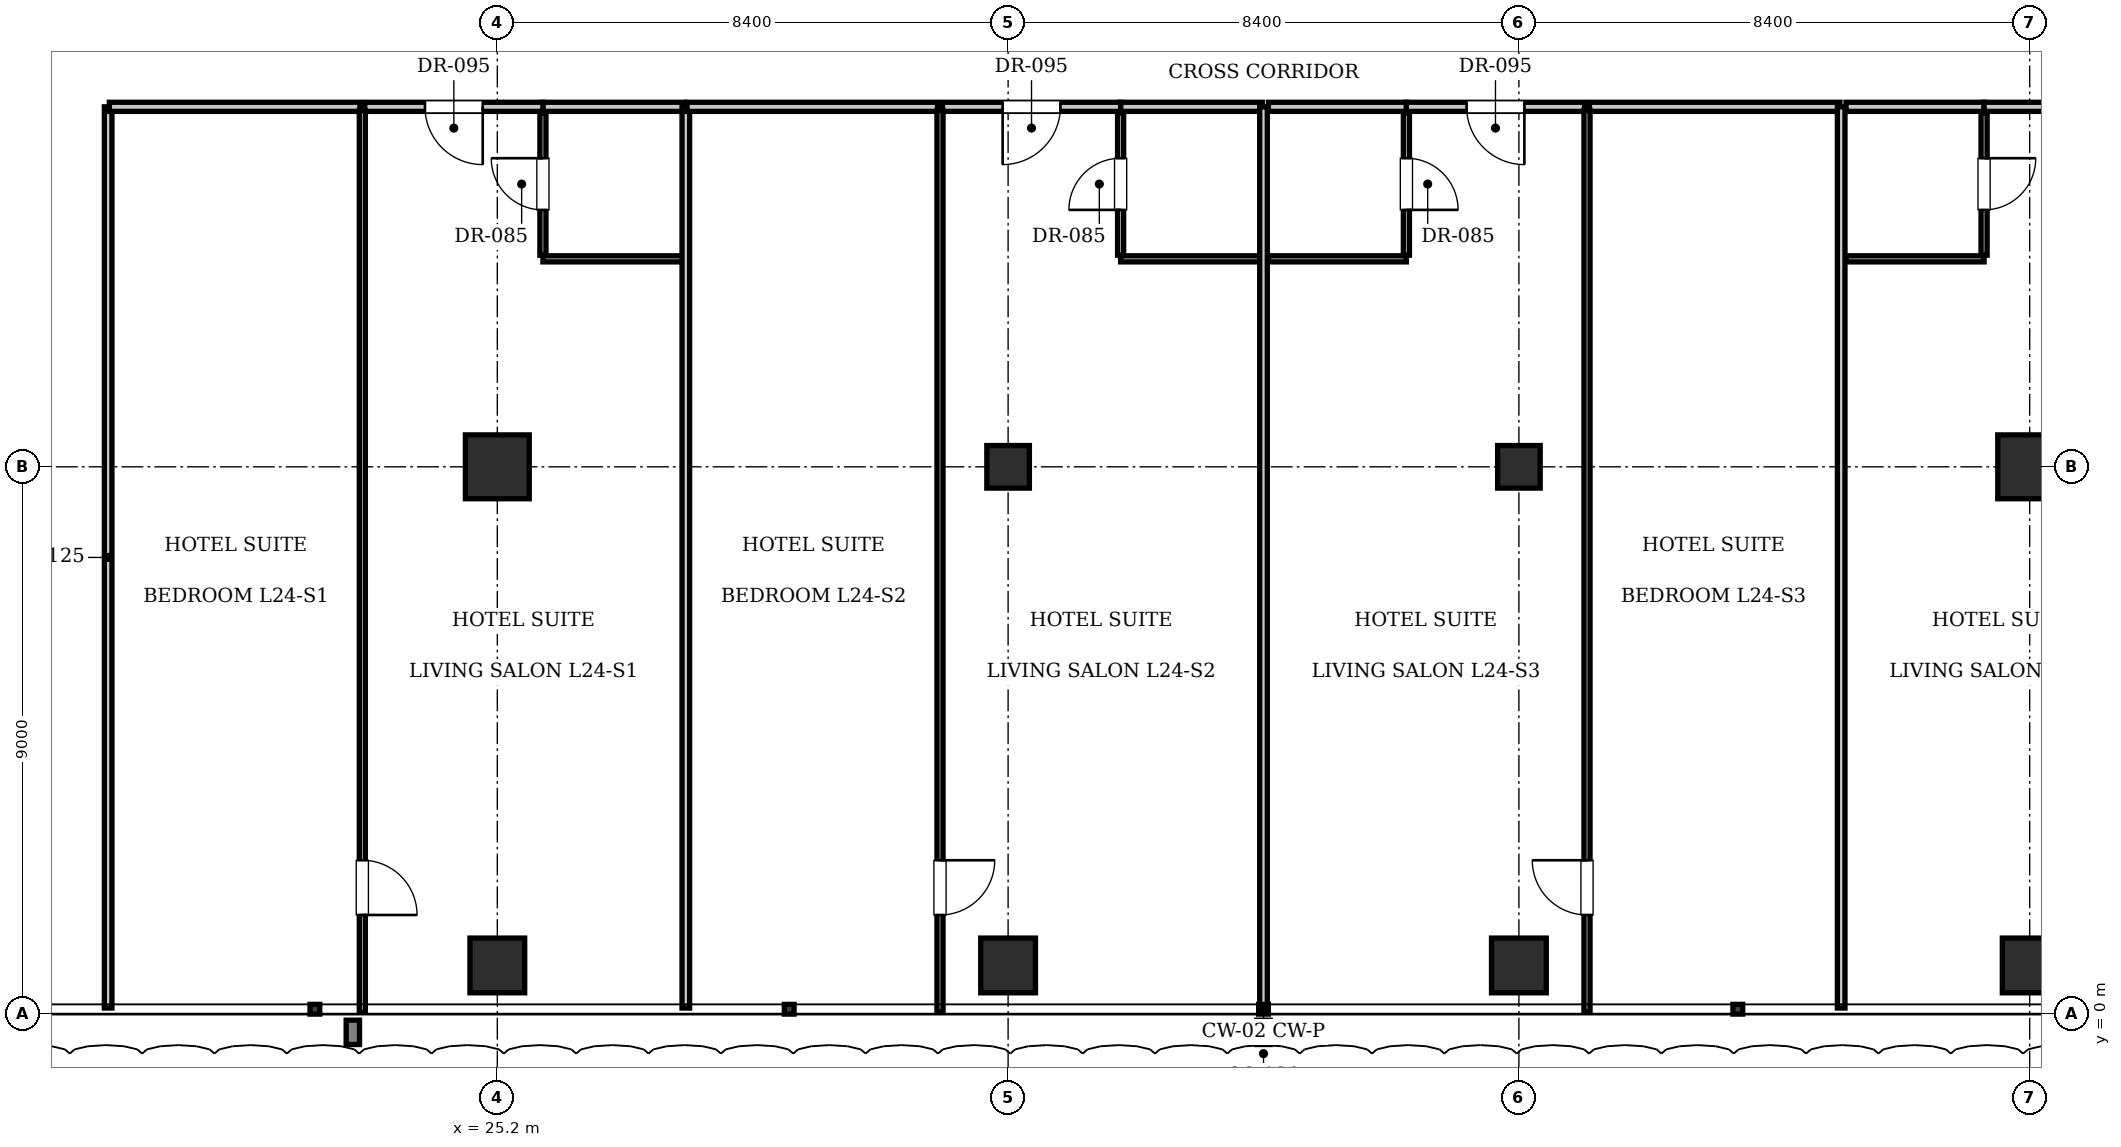
"""IFC4 building model, lengths in metres.
Left out: names, types, materials, properties, quantities, classifications, styles, units other than length and angle.
Written with IfcOpenShell. Run it as: python <this file> out.ifc"""

import sys

from ifc_helpers import new_model, si_unit, direction, frame, frame_2d, origin, origin_2d, place, context, subcontext, project, spatial, rectangle, i_section, extrude, element, fill, save


model = new_model("IFC4")
c1 = context("Model", 3, precision=1e-05, world=origin(), true_north=direction((0.0, 1.0)))
c2 = subcontext(c1, "Body", "Model", "MODEL_VIEW")
j1 = project(units=[si_unit("LENGTHUNIT", "METRE"), si_unit("PLANEANGLEUNIT", "RADIAN")], contexts=[c1])
p1 = place(None, origin())
s1 = spatial("IfcSite", under=j1, at=p1, CompositionType="ELEMENT")
p2 = place(p1, origin())
s2 = spatial("IfcBuilding", under=s1, at=p2, CompositionType="ELEMENT")
p3 = place(p2, frame((0.0, 0.0, 100.1)))
s3 = spatial("IfcBuildingStorey", under=s2, at=p3, CompositionType="ELEMENT", Elevation=100.1)
for number, where, z_axis, x_axis in (
    (1, (25.2, 9.0, 0.0), (0.0, 0.0, 1.0), (1.0, 0.0, 0.0)),
    (2, (50.4, 9.0, 0.0), (0.0, 0.0, 1.0), (1.0, 0.0, 0.0)),
):
    element("IfcColumn", number, at=place(p3, frame(where, z_axis=z_axis, x_axis=x_axis)), inside=s3, PredefinedType="COLUMN", context=c2, shape_type="SweptSolid", body=[
        extrude(rectangle(XDim=1.05, YDim=1.05, at=origin_2d()), origin(), (0.0, 0.0, 1.0), 3.85),
    ])
for number, where, z_axis, x_axis in (
    (3, (33.6, 9.0, 0.0), (0.0, 0.0, 1.0), (1.0, 0.0, 0.0)),
    (4, (42.0, 9.0, 0.0), (0.0, 0.0, 1.0), (1.0, 0.0, 0.0)),
):
    element("IfcColumn", number, at=place(p3, frame(where, z_axis=z_axis, x_axis=x_axis)), inside=s3, PredefinedType="COLUMN", context=c2, shape_type="SweptSolid", body=[
        extrude(i_section(OverallWidth=0.7, OverallDepth=0.7, WebThickness=0.028, FlangeThickness=0.044, at=origin_2d()), origin(), (0.0, 0.0, 1.0), 3.85),
    ])
for number, where, z_axis, x_axis in (
    (5, (25.2, 0.8, 0.0), (0.0, 0.0, 1.0), (1.0, 0.0, 0.0)),
    (6, (33.6, 0.8, 0.0), (0.0, 0.0, 1.0), (1.0, 0.0, 0.0)),
    (7, (42.0, 0.8, 0.0), (0.0, 0.0, 1.0), (1.0, 0.0, 0.0)),
    (8, (50.4, 0.8, 0.0), (0.0, 0.0, 1.0), (1.0, 0.0, 0.0)),
):
    element("IfcColumn", number, at=place(p3, frame(where, z_axis=z_axis, x_axis=x_axis)), inside=s3, PredefinedType="COLUMN", context=c2, shape_type="SweptSolid", body=[
        extrude(rectangle(XDim=0.9, YDim=0.9, at=origin_2d()), origin(), (0.0, 0.0, 1.0), 3.85),
    ])
p4 = place(p3, frame((18.8, 0.1, 0.0), z_axis=(0.0, 0.0, 1.0), x_axis=(0.0, 1.0, 0.0)))
e9 = element("IfcWall", 9, at=p4, inside=s3, PredefinedType="PARTITIONING", context=c2, shape_type="SweptSolid", body=[
    extrude(rectangle(XDim=14.82, YDim=0.125, at=frame_2d((7.41, 0.0))), origin(), (0.0, 0.0, 1.0), 3.61),
])
p5 = place(p3, frame((25.95, 14.92, 0.0), z_axis=(0.0, 0.0, 1.0), x_axis=(1.0, 0.0, 0.0)))
e10 = element("IfcWall", 10, at=p5, inside=s3, PredefinedType="PARTITIONING", context=c2, shape_type="SweptSolid", body=[
    extrude(rectangle(XDim=2.33, YDim=0.15, at=frame_2d((1.165, 0.0))), origin(), (0.0, 0.0, 1.0), 3.61),
])
p6 = place(p3, frame((25.95, 12.42, 0.0), z_axis=(0.0, 0.0, 1.0), x_axis=(1.0, 0.0, 0.0)))
e11 = element("IfcWall", 11, at=p6, inside=s3, PredefinedType="PARTITIONING", context=c2, shape_type="SweptSolid", body=[
    extrude(rectangle(XDim=2.31, YDim=0.1, at=frame_2d((1.155, 0.0))), origin(), (0.0, 0.0, 1.0), 3.61),
])
p7 = place(p3, frame((25.95, 12.48, 0.0), z_axis=(0.0, 0.0, 1.0), x_axis=(0.0, 1.0, 0.0)))
e12 = element("IfcWall", 12, at=p7, inside=s3, PredefinedType="PARTITIONING", context=c2, shape_type="SweptSolid", body=[
    extrude(rectangle(XDim=2.34, YDim=0.1, at=frame_2d((1.17, 0.0))), origin(), (0.0, 0.0, 1.0), 3.61),
])
p8 = place(p7, frame((0.745, 0.0, 0.0)))
e13 = element("IfcOpeningElement", 13, at=p8, cuts=e12, PredefinedType="OPENING", context=c2, shape_type="SweptSolid", body=[
    extrude(rectangle(XDim=0.85, YDim=2.1, at=frame_2d((0.425, 1.05))), frame((0.0, 0.06, 0.0), z_axis=(0.0, -1.0, 0.0), x_axis=(1.0, 0.0, 0.0)), (0.0, 0.0, 1.0), 0.12),
])
p9 = place(p3, frame((18.82, 14.92, 0.0), z_axis=(0.0, 0.0, 1.0), x_axis=(1.0, 0.0, 0.0)))
e14 = element("IfcWall", 14, at=p9, inside=s3, PredefinedType="PARTITIONING", context=c2, shape_type="SweptSolid", body=[
    extrude(rectangle(XDim=4.12, YDim=0.15, at=frame_2d((2.06, 0.0))), origin(), (0.0, 0.0, 1.0), 3.61),
])
p10 = place(p3, frame((23.02, 14.92, 0.0), z_axis=(0.0, 0.0, 1.0), x_axis=(1.0, 0.0, 0.0)))
e15 = element("IfcWall", 15, at=p10, inside=s3, PredefinedType="PARTITIONING", context=c2, shape_type="SweptSolid", body=[
    extrude(rectangle(XDim=2.93, YDim=0.15, at=frame_2d((1.465, 0.0))), origin(), (0.0, 0.0, 1.0), 3.61),
])
p11 = place(p10, frame((0.99, 0.0, 0.0)))
e16 = element("IfcOpeningElement", 16, at=p11, cuts=e15, PredefinedType="OPENING", context=c2, shape_type="SweptSolid", body=[
    extrude(rectangle(XDim=0.95, YDim=2.15, at=frame_2d((0.475, 1.075))), frame((0.0, 0.085, 0.0), z_axis=(0.0, -1.0, 0.0), x_axis=(1.0, 0.0, 0.0)), (0.0, 0.0, 1.0), 0.17),
])
p12 = place(p3, frame((22.98, 0.03, 0.0), z_axis=(0.0, 0.0, 1.0), x_axis=(0.0, 1.0, 0.0)))
e17 = element("IfcWall", 17, at=p12, inside=s3, PredefinedType="PARTITIONING", context=c2, shape_type="SweptSolid", body=[
    extrude(rectangle(XDim=14.83, YDim=0.1, at=frame_2d((7.415, 0.0))), origin(), (0.0, 0.0, 1.0), 3.61),
])
p13 = place(p12, frame((1.6, 0.0, 0.0)))
e18 = element("IfcOpeningElement", 18, at=p13, cuts=e17, PredefinedType="OPENING", context=c2, shape_type="SweptSolid", body=[
    extrude(rectangle(XDim=0.9, YDim=2.1, at=frame_2d((0.45, 1.05))), frame((0.0, 0.06, 0.0), z_axis=(0.0, -1.0, 0.0), x_axis=(1.0, 0.0, 0.0)), (0.0, 0.0, 1.0), 0.12),
])
p14 = place(p3, frame((28.3, 0.1, 0.0), z_axis=(0.0, 0.0, 1.0), x_axis=(0.0, 1.0, 0.0)))
e19 = element("IfcWall", 19, at=p14, inside=s3, PredefinedType="PARTITIONING", context=c2, shape_type="SweptSolid", body=[
    extrude(rectangle(XDim=14.82, YDim=0.125, at=frame_2d((7.41, 0.0))), origin(), (0.0, 0.0, 1.0), 3.61),
])
p15 = place(p3, frame((35.45, 14.92, 0.0), z_axis=(0.0, 0.0, 1.0), x_axis=(1.0, 0.0, 0.0)))
e20 = element("IfcWall", 20, at=p15, inside=s3, PredefinedType="PARTITIONING", context=c2, shape_type="SweptSolid", body=[
    extrude(rectangle(XDim=2.33, YDim=0.15, at=frame_2d((1.165, 0.0))), origin(), (0.0, 0.0, 1.0), 3.61),
])
p16 = place(p3, frame((35.45, 12.42, 0.0), z_axis=(0.0, 0.0, 1.0), x_axis=(1.0, 0.0, 0.0)))
e21 = element("IfcWall", 21, at=p16, inside=s3, PredefinedType="PARTITIONING", context=c2, shape_type="SweptSolid", body=[
    extrude(rectangle(XDim=2.31, YDim=0.1, at=frame_2d((1.155, 0.0))), origin(), (0.0, 0.0, 1.0), 3.61),
])
p17 = place(p3, frame((35.45, 12.48, 0.0), z_axis=(0.0, 0.0, 1.0), x_axis=(0.0, 1.0, 0.0)))
e22 = element("IfcWall", 22, at=p17, inside=s3, PredefinedType="PARTITIONING", context=c2, shape_type="SweptSolid", body=[
    extrude(rectangle(XDim=2.34, YDim=0.1, at=frame_2d((1.17, 0.0))), origin(), (0.0, 0.0, 1.0), 3.61),
])
p18 = place(p17, frame((0.745, 0.0, 0.0)))
e23 = element("IfcOpeningElement", 23, at=p18, cuts=e22, PredefinedType="OPENING", context=c2, shape_type="SweptSolid", body=[
    extrude(rectangle(XDim=0.85, YDim=2.1, at=frame_2d((0.425, 1.05))), frame((0.0, 0.06, 0.0), z_axis=(0.0, -1.0, 0.0), x_axis=(1.0, 0.0, 0.0)), (0.0, 0.0, 1.0), 0.12),
])
p19 = place(p3, frame((28.32, 14.92, 0.0), z_axis=(0.0, 0.0, 1.0), x_axis=(1.0, 0.0, 0.0)))
e24 = element("IfcWall", 24, at=p19, inside=s3, PredefinedType="PARTITIONING", context=c2, shape_type="SweptSolid", body=[
    extrude(rectangle(XDim=4.12, YDim=0.15, at=frame_2d((2.06, 0.0))), origin(), (0.0, 0.0, 1.0), 3.61),
])
p20 = place(p3, frame((32.52, 14.92, 0.0), z_axis=(0.0, 0.0, 1.0), x_axis=(1.0, 0.0, 0.0)))
e25 = element("IfcWall", 25, at=p20, inside=s3, PredefinedType="PARTITIONING", context=c2, shape_type="SweptSolid", body=[
    extrude(rectangle(XDim=2.93, YDim=0.15, at=frame_2d((1.465, 0.0))), origin(), (0.0, 0.0, 1.0), 3.61),
])
p21 = place(p20, frame((0.99, 0.0, 0.0)))
e26 = element("IfcOpeningElement", 26, at=p21, cuts=e25, PredefinedType="OPENING", context=c2, shape_type="SweptSolid", body=[
    extrude(rectangle(XDim=0.95, YDim=2.15, at=frame_2d((0.475, 1.075))), frame((0.0, 0.085, 0.0), z_axis=(0.0, -1.0, 0.0), x_axis=(1.0, 0.0, 0.0)), (0.0, 0.0, 1.0), 0.17),
])
p22 = place(p3, frame((32.48, 0.03, 0.0), z_axis=(0.0, 0.0, 1.0), x_axis=(0.0, 1.0, 0.0)))
e27 = element("IfcWall", 27, at=p22, inside=s3, PredefinedType="PARTITIONING", context=c2, shape_type="SweptSolid", body=[
    extrude(rectangle(XDim=14.83, YDim=0.1, at=frame_2d((7.415, 0.0))), origin(), (0.0, 0.0, 1.0), 3.61),
])
p23 = place(p22, frame((1.6, 0.0, 0.0)))
e28 = element("IfcOpeningElement", 28, at=p23, cuts=e27, PredefinedType="OPENING", context=c2, shape_type="SweptSolid", body=[
    extrude(rectangle(XDim=0.9, YDim=2.1, at=frame_2d((0.45, 1.05))), frame((0.0, 0.06, 0.0), z_axis=(0.0, -1.0, 0.0), x_axis=(1.0, 0.0, 0.0)), (0.0, 0.0, 1.0), 0.12),
])
p24 = place(p3, frame((37.8, 0.1, 0.0), z_axis=(0.0, 0.0, 1.0), x_axis=(0.0, 1.0, 0.0)))
e29 = element("IfcWall", 29, at=p24, inside=s3, PredefinedType="PARTITIONING", context=c2, shape_type="SweptSolid", body=[
    extrude(rectangle(XDim=14.82, YDim=0.125, at=frame_2d((7.41, 0.0))), origin(), (0.0, 0.0, 1.0), 3.352),
])
p25 = place(p3, frame((37.88, 14.92, 0.0), z_axis=(0.0, 0.0, 1.0), x_axis=(1.0, 0.0, 0.0)))
e30 = element("IfcWall", 30, at=p25, inside=s3, PredefinedType="PARTITIONING", context=c2, shape_type="SweptSolid", body=[
    extrude(rectangle(XDim=2.27, YDim=0.15, at=frame_2d((1.135, 0.0))), origin(), (0.0, 0.0, 1.0), 3.61),
])
p26 = place(p3, frame((37.88, 12.42, 0.0), z_axis=(0.0, 0.0, 1.0), x_axis=(1.0, 0.0, 0.0)))
e31 = element("IfcWall", 31, at=p26, inside=s3, PredefinedType="PARTITIONING", context=c2, shape_type="SweptSolid", body=[
    extrude(rectangle(XDim=2.27, YDim=0.1, at=frame_2d((1.135, 0.0))), origin(), (0.0, 0.0, 1.0), 3.61),
])
p27 = place(p3, frame((40.15, 12.48, 0.0), z_axis=(0.0, 0.0, 1.0), x_axis=(0.0, 1.0, 0.0)))
e32 = element("IfcWall", 32, at=p27, inside=s3, PredefinedType="PARTITIONING", context=c2, shape_type="SweptSolid", body=[
    extrude(rectangle(XDim=2.34, YDim=0.1, at=frame_2d((1.17, 0.0))), origin(), (0.0, 0.0, 1.0), 3.61),
])
p28 = place(p27, frame((0.745, 0.0, 0.0)))
e33 = element("IfcOpeningElement", 33, at=p28, cuts=e32, PredefinedType="OPENING", context=c2, shape_type="SweptSolid", body=[
    extrude(rectangle(XDim=0.85, YDim=2.1, at=frame_2d((0.425, 1.05))), frame((0.0, 0.06, 0.0), z_axis=(0.0, -1.0, 0.0), x_axis=(1.0, 0.0, 0.0)), (0.0, 0.0, 1.0), 0.12),
])
p29 = place(p3, frame((40.15, 14.92, 0.0), z_axis=(0.0, 0.0, 1.0), x_axis=(1.0, 0.0, 0.0)))
e34 = element("IfcWall", 34, at=p29, inside=s3, PredefinedType="PARTITIONING", context=c2, shape_type="SweptSolid", body=[
    extrude(rectangle(XDim=2.93, YDim=0.15, at=frame_2d((1.465, 0.0))), origin(), (0.0, 0.0, 1.0), 3.61),
])
p30 = place(p29, frame((0.99, 0.0, 0.0)))
e35 = element("IfcOpeningElement", 35, at=p30, cuts=e34, PredefinedType="OPENING", context=c2, shape_type="SweptSolid", body=[
    extrude(rectangle(XDim=0.95, YDim=2.15, at=frame_2d((0.475, 1.075))), frame((0.0, 0.085, 0.0), z_axis=(0.0, -1.0, 0.0), x_axis=(1.0, 0.0, 0.0)), (0.0, 0.0, 1.0), 0.17),
])
p31 = place(p3, frame((43.16, 14.92, 0.0), z_axis=(0.0, 0.0, 1.0), x_axis=(1.0, 0.0, 0.0)))
e36 = element("IfcWall", 36, at=p31, inside=s3, PredefinedType="PARTITIONING", context=c2, shape_type="SweptSolid", body=[
    extrude(rectangle(XDim=4.12, YDim=0.15, at=frame_2d((2.06, 0.0))), origin(), (0.0, 0.0, 1.0), 3.61),
])
p32 = place(p3, frame((43.12, 0.03, 0.0), z_axis=(0.0, 0.0, 1.0), x_axis=(0.0, 1.0, 0.0)))
e37 = element("IfcWall", 37, at=p32, inside=s3, PredefinedType="PARTITIONING", context=c2, shape_type="SweptSolid", body=[
    extrude(rectangle(XDim=14.83, YDim=0.1, at=frame_2d((7.415, 0.0))), origin(), (0.0, 0.0, 1.0), 3.61),
])
p33 = place(p32, frame((1.6, 0.0, 0.0)))
e38 = element("IfcOpeningElement", 38, at=p33, cuts=e37, PredefinedType="OPENING", context=c2, shape_type="SweptSolid", body=[
    extrude(rectangle(XDim=0.9, YDim=2.1, at=frame_2d((0.45, 1.05))), frame((0.0, 0.06, 0.0), z_axis=(0.0, -1.0, 0.0), x_axis=(1.0, 0.0, 0.0)), (0.0, 0.0, 1.0), 0.12),
])
p34 = place(p3, frame((47.3, 0.1, 0.0), z_axis=(0.0, 0.0, 1.0), x_axis=(0.0, 1.0, 0.0)))
e39 = element("IfcWall", 39, at=p34, inside=s3, PredefinedType="PARTITIONING", context=c2, shape_type="SweptSolid", body=[
    extrude(rectangle(XDim=14.82, YDim=0.125, at=frame_2d((7.41, 0.0))), origin(), (0.0, 0.0, 1.0), 3.61),
])
p35 = place(p3, frame((47.38, 14.92, 0.0), z_axis=(0.0, 0.0, 1.0), x_axis=(1.0, 0.0, 0.0)))
e40 = element("IfcWall", 40, at=p35, inside=s3, PredefinedType="PARTITIONING", context=c2, shape_type="SweptSolid", body=[
    extrude(rectangle(XDim=2.27, YDim=0.15, at=frame_2d((1.135, 0.0))), origin(), (0.0, 0.0, 1.0), 3.61),
])
p36 = place(p3, frame((47.38, 12.42, 0.0), z_axis=(0.0, 0.0, 1.0), x_axis=(1.0, 0.0, 0.0)))
e41 = element("IfcWall", 41, at=p36, inside=s3, PredefinedType="PARTITIONING", context=c2, shape_type="SweptSolid", body=[
    extrude(rectangle(XDim=2.27, YDim=0.1, at=frame_2d((1.135, 0.0))), origin(), (0.0, 0.0, 1.0), 3.61),
])
p37 = place(p3, frame((49.65, 12.48, 0.0), z_axis=(0.0, 0.0, 1.0), x_axis=(0.0, 1.0, 0.0)))
e42 = element("IfcWall", 42, at=p37, inside=s3, PredefinedType="PARTITIONING", context=c2, shape_type="SweptSolid", body=[
    extrude(rectangle(XDim=2.34, YDim=0.1, at=frame_2d((1.17, 0.0))), origin(), (0.0, 0.0, 1.0), 3.61),
])
p38 = place(p37, frame((0.745, 0.0, 0.0)))
e43 = element("IfcOpeningElement", 43, at=p38, cuts=e42, PredefinedType="OPENING", context=c2, shape_type="SweptSolid", body=[
    extrude(rectangle(XDim=0.85, YDim=2.1, at=frame_2d((0.425, 1.05))), frame((0.0, 0.06, 0.0), z_axis=(0.0, -1.0, 0.0), x_axis=(1.0, 0.0, 0.0)), (0.0, 0.0, 1.0), 0.12),
])
p39 = place(p3, frame((49.65, 14.92, 0.0), z_axis=(0.0, 0.0, 1.0), x_axis=(1.0, 0.0, 0.0)))
e44 = element("IfcWall", 44, at=p39, inside=s3, PredefinedType="PARTITIONING", context=c2, shape_type="SweptSolid", body=[
    extrude(rectangle(XDim=2.93, YDim=0.15, at=frame_2d((1.465, 0.0))), origin(), (0.0, 0.0, 1.0), 3.61),
])
p40 = place(p39, frame((0.99, 0.0, 0.0)))
e45 = element("IfcOpeningElement", 45, at=p40, cuts=e44, PredefinedType="OPENING", context=c2, shape_type="SweptSolid", body=[
    extrude(rectangle(XDim=0.95, YDim=2.15, at=frame_2d((0.475, 1.075))), frame((0.0, 0.085, 0.0), z_axis=(0.0, -1.0, 0.0), x_axis=(1.0, 0.0, 0.0)), (0.0, 0.0, 1.0), 0.17),
])
p41 = place(p8, origin())
e46 = element("IfcDoor", 46, at=p41, inside=s3, OperationType="SINGLE_SWING_RIGHT", PredefinedType="DOOR", context=c2, shape_type="SweptSolid", body=[
    extrude(rectangle(XDim=0.85, YDim=2.1, at=frame_2d((0.425, 1.05))), frame((0.0, 0.025, 0.0), z_axis=(0.0, -1.0, 0.0), x_axis=(1.0, 0.0, 0.0)), (0.0, 0.0, 1.0), 0.05),
])
fill(e13, e46)
p42 = place(p11, frame((0.95, 0.0, 0.0), z_axis=(0.0, 0.0, 1.0), x_axis=(-1.0, 0.0, 0.0)))
e47 = element("IfcDoor", 47, at=p42, inside=s3, OperationType="SINGLE_SWING_LEFT", PredefinedType="DOOR", context=c2, shape_type="SweptSolid", body=[
    extrude(rectangle(XDim=0.95, YDim=2.15, at=frame_2d((0.475, 1.075))), frame((0.0, 0.025, 0.0), z_axis=(0.0, -1.0, 0.0), x_axis=(1.0, 0.0, 0.0)), (0.0, 0.0, 1.0), 0.05),
])
fill(e16, e47)
p43 = place(p13, frame((0.9, 0.0, 0.0), z_axis=(0.0, 0.0, 1.0), x_axis=(-1.0, 0.0, 0.0)))
e48 = element("IfcDoor", 48, at=p43, inside=s3, OperationType="SINGLE_SWING_RIGHT", PredefinedType="DOOR", context=c2, shape_type="SweptSolid", body=[
    extrude(rectangle(XDim=0.9, YDim=2.1, at=frame_2d((0.45, 1.05))), frame((0.0, 0.025, 0.0), z_axis=(0.0, -1.0, 0.0), x_axis=(1.0, 0.0, 0.0)), (0.0, 0.0, 1.0), 0.05),
])
fill(e18, e48)
p44 = place(p18, origin())
e49 = element("IfcDoor", 49, at=p44, inside=s3, OperationType="SINGLE_SWING_LEFT", PredefinedType="DOOR", context=c2, shape_type="SweptSolid", body=[
    extrude(rectangle(XDim=0.85, YDim=2.1, at=frame_2d((0.425, 1.05))), frame((0.0, 0.025, 0.0), z_axis=(0.0, -1.0, 0.0), x_axis=(1.0, 0.0, 0.0)), (0.0, 0.0, 1.0), 0.05),
])
fill(e23, e49)
p45 = place(p21, frame((0.95, 0.0, 0.0), z_axis=(0.0, 0.0, 1.0), x_axis=(-1.0, 0.0, 0.0)))
e50 = element("IfcDoor", 50, at=p45, inside=s3, OperationType="SINGLE_SWING_RIGHT", PredefinedType="DOOR", context=c2, shape_type="SweptSolid", body=[
    extrude(rectangle(XDim=0.95, YDim=2.15, at=frame_2d((0.475, 1.075))), frame((0.0, 0.025, 0.0), z_axis=(0.0, -1.0, 0.0), x_axis=(1.0, 0.0, 0.0)), (0.0, 0.0, 1.0), 0.05),
])
fill(e26, e50)
p46 = place(p23, frame((0.9, 0.0, 0.0), z_axis=(0.0, 0.0, 1.0), x_axis=(-1.0, 0.0, 0.0)))
e51 = element("IfcDoor", 51, at=p46, inside=s3, OperationType="SINGLE_SWING_LEFT", PredefinedType="DOOR", context=c2, shape_type="SweptSolid", body=[
    extrude(rectangle(XDim=0.9, YDim=2.1, at=frame_2d((0.45, 1.05))), frame((0.0, 0.025, 0.0), z_axis=(0.0, -1.0, 0.0), x_axis=(1.0, 0.0, 0.0)), (0.0, 0.0, 1.0), 0.05),
])
fill(e28, e51)
p47 = place(p28, frame((0.85, 0.0, 0.0), z_axis=(0.0, 0.0, 1.0), x_axis=(-1.0, 0.0, 0.0)))
e52 = element("IfcDoor", 52, at=p47, inside=s3, OperationType="SINGLE_SWING_RIGHT", PredefinedType="DOOR", context=c2, shape_type="SweptSolid", body=[
    extrude(rectangle(XDim=0.85, YDim=2.1, at=frame_2d((0.425, 1.05))), frame((0.0, 0.025, 0.0), z_axis=(0.0, -1.0, 0.0), x_axis=(1.0, 0.0, 0.0)), (0.0, 0.0, 1.0), 0.05),
])
fill(e33, e52)
p48 = place(p30, frame((0.95, 0.0, 0.0), z_axis=(0.0, 0.0, 1.0), x_axis=(-1.0, 0.0, 0.0)))
e53 = element("IfcDoor", 53, at=p48, inside=s3, OperationType="SINGLE_SWING_LEFT", PredefinedType="DOOR", context=c2, shape_type="SweptSolid", body=[
    extrude(rectangle(XDim=0.95, YDim=2.15, at=frame_2d((0.475, 1.075))), frame((0.0, 0.025, 0.0), z_axis=(0.0, -1.0, 0.0), x_axis=(1.0, 0.0, 0.0)), (0.0, 0.0, 1.0), 0.05),
])
fill(e35, e53)
p49 = place(p33, origin())
e54 = element("IfcDoor", 54, at=p49, inside=s3, OperationType="SINGLE_SWING_RIGHT", PredefinedType="DOOR", context=c2, shape_type="SweptSolid", body=[
    extrude(rectangle(XDim=0.9, YDim=2.1, at=frame_2d((0.45, 1.05))), frame((0.0, 0.025, 0.0), z_axis=(0.0, -1.0, 0.0), x_axis=(1.0, 0.0, 0.0)), (0.0, 0.0, 1.0), 0.05),
])
fill(e38, e54)
p50 = place(p38, frame((0.85, 0.0, 0.0), z_axis=(0.0, 0.0, 1.0), x_axis=(-1.0, 0.0, 0.0)))
e55 = element("IfcDoor", 55, at=p50, inside=s3, OperationType="SINGLE_SWING_LEFT", PredefinedType="DOOR", context=c2, shape_type="SweptSolid", body=[
    extrude(rectangle(XDim=0.85, YDim=2.1, at=frame_2d((0.425, 1.05))), frame((0.0, 0.025, 0.0), z_axis=(0.0, -1.0, 0.0), x_axis=(1.0, 0.0, 0.0)), (0.0, 0.0, 1.0), 0.05),
])
fill(e43, e55)
save(model, sys.argv[1])
